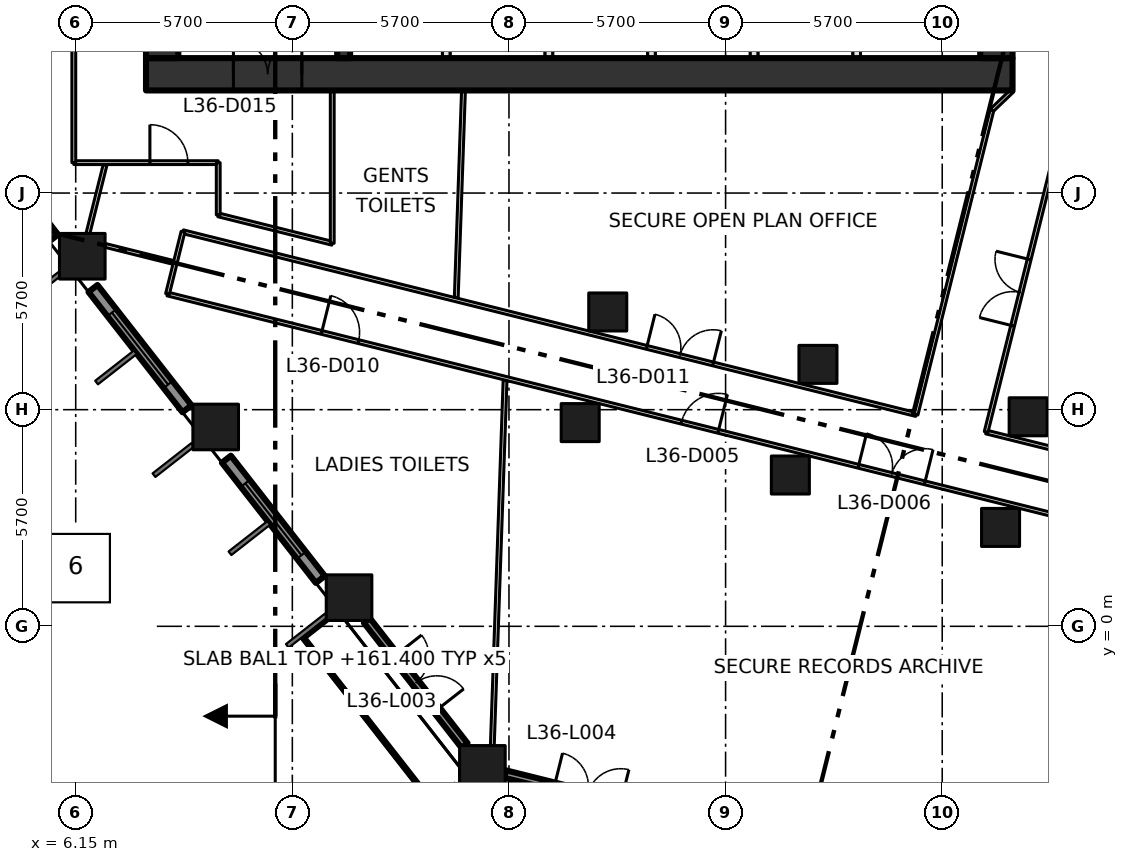
"""IFC4 building model, lengths in metres.
Left out: names, types, materials, properties, quantities, classifications, styles, units other than length and angle.
Written with IfcOpenShell. Run it as: python <this file> out.ifc"""

import sys

from ifc_helpers import new_model, si_unit, direction, frame, frame_2d, origin, origin_2d, place, context, subcontext, project, spatial, rectangle, extrude, element, fill, save


model = new_model("IFC4")
c1 = context("Model", 3, precision=1e-05, world=origin(), true_north=direction((0.0, 1.0)))
c2 = subcontext(c1, "Body", "Model", "MODEL_VIEW")
j1 = project(units=[si_unit("LENGTHUNIT", "METRE"), si_unit("PLANEANGLEUNIT", "RADIAN")], contexts=[c1])
p1 = place(None, origin())
s1 = spatial("IfcSite", under=j1, at=p1, CompositionType="ELEMENT")
p2 = place(p1, origin())
s2 = spatial("IfcBuilding", under=s1, at=p2, CompositionType="ELEMENT")
p3 = place(p2, frame((0.0, 0.0, 161.4)))
s3 = spatial("IfcBuildingStorey", under=s2, at=p3, CompositionType="ELEMENT", Elevation=161.4)
for number, where, z_axis, x_axis in (
    (1, (16.851, -3.738, 0.0), (0.0, 0.0, 1.0), (1.0, 0.0, 0.0)),
    (2, (13.342, 0.754, 0.0), (0.0, 0.0, 1.0), (1.0, 0.0, 0.0)),
    (3, (9.833, 5.245, 0.0), (0.0, 0.0, 1.0), (1.0, 0.0, 0.0)),
    (4, (6.323, 9.737, 0.0), (0.0, 0.0, 1.0), (1.0, 0.0, 0.0)),
):
    element("IfcColumn", number, at=place(p3, frame(where, z_axis=z_axis, x_axis=x_axis)), inside=s3, PredefinedType="COLUMN", context=c2, shape_type="SweptSolid", body=[
        extrude(rectangle(XDim=1.2, YDim=1.2, at=origin_2d()), origin(), (0.0, 0.0, 1.0), 4.2),
    ])
for number, where, z_axis, x_axis in (
    (5, (19.424, 5.36, 0.0), (0.0, 0.0, 1.0), (1.0, 0.0, 0.0)),
    (6, (24.954, 3.981, 0.0), (0.0, 0.0, 1.0), (1.0, 0.0, 0.0)),
    (7, (30.485, 2.602, 0.0), (0.0, 0.0, 1.0), (1.0, 0.0, 0.0)),
    (8, (20.149, 8.271, 0.0), (0.0, 0.0, 1.0), (1.0, 0.0, 0.0)),
    (9, (25.68, 6.892, 0.0), (0.0, 0.0, 1.0), (1.0, 0.0, 0.0)),
    (10, (31.211, 5.513, 0.0), (0.0, 0.0, 1.0), (1.0, 0.0, 0.0)),
):
    element("IfcColumn", number, at=place(p3, frame(where, z_axis=z_axis, x_axis=x_axis)), inside=s3, PredefinedType="COLUMN", context=c2, shape_type="SweptSolid", body=[
        extrude(rectangle(XDim=1.0, YDim=1.0, at=origin_2d()), origin(), (0.0, 0.0, 1.0), 4.2),
    ])
p4 = place(p3, frame((8.0, 14.525, -0.3), z_axis=(0.0, 0.0, 1.0), x_axis=(1.0, 0.0, 0.0)))
e11 = element("IfcWall", 11, at=p4, inside=s3, PredefinedType="SHEAR", context=c2, shape_type="SweptSolid", body=[
    extrude(rectangle(XDim=22.8, YDim=0.85, at=frame_2d((11.4, 0.0))), origin(), (0.0, 0.0, 1.0), 4.2),
])
p5 = place(p4, frame((2.3, 0.0, 0.3)))
e12 = element("IfcOpeningElement", 12, at=p5, cuts=e11, PredefinedType="OPENING", context=c2, shape_type="SweptSolid", body=[
    extrude(rectangle(XDim=1.8, YDim=2.1, at=frame_2d((0.9, 1.05))), frame((0.0, 0.435, 0.0), z_axis=(0.0, -1.0, 0.0), x_axis=(1.0, 0.0, 0.0)), (0.0, 0.0, 1.0), 0.87),
])
for number, where, z_axis, x_axis in (
    (13, (8.425, 14.95, -0.3), (0.0, 0.0, 1.0), (0.0, 1.0, 0.0)),
    (14, (30.375, 14.95, -0.3), (0.0, 0.0, 1.0), (0.0, 1.0, 0.0)),
):
    element("IfcWall", number, at=place(p3, frame(where, z_axis=z_axis, x_axis=x_axis)), inside=s3, PredefinedType="SHEAR", context=c2, shape_type="SweptSolid", body=[
        extrude(rectangle(XDim=20.75, YDim=0.85, at=frame_2d((10.375, 0.0))), origin(), (0.0, 0.0, 1.0), 4.2),
    ])
p6 = place(p3, frame((13.2, 14.95, 0.0), z_axis=(0.0, 0.0, 1.0), x_axis=(0.0, 1.0, 0.0)))
e15 = element("IfcWall", 15, at=p6, inside=s3, PredefinedType="SHEAR", context=c2, shape_type="SweptSolid", body=[
    extrude(rectangle(XDim=20.75, YDim=0.34, at=frame_2d((10.375, 0.0))), origin(), (0.0, 0.0, 1.0), 3.9),
])
p7 = place(p6, frame((3.35, 0.0, 0.0)))
e16 = element("IfcOpeningElement", 16, at=p7, cuts=e15, PredefinedType="OPENING", context=c2, shape_type="SweptSolid", body=[
    extrude(rectangle(XDim=1.8, YDim=2.1, at=frame_2d((0.9, 1.05))), frame((0.0, 0.18, 0.0), z_axis=(0.0, -1.0, 0.0), x_axis=(1.0, 0.0, 0.0)), (0.0, 0.0, 1.0), 0.36),
])
p8 = place(p6, frame((11.45, 0.0, 0.0)))
e17 = element("IfcOpeningElement", 17, at=p8, cuts=e15, PredefinedType="OPENING", context=c2, shape_type="SweptSolid", body=[
    extrude(rectangle(XDim=1.2, YDim=2.1, at=frame_2d((0.6, 1.05))), frame((0.0, 0.18, 0.0), z_axis=(0.0, -1.0, 0.0), x_axis=(1.0, 0.0, 0.0)), (0.0, 0.0, 1.0), 0.36),
])
for number, where, z_axis, x_axis in (
    (18, (15.9, 14.95, 0.0), (0.0, 0.0, 1.0), (0.0, 1.0, 0.0)),
    (19, (18.6, 14.95, 0.0), (0.0, 0.0, 1.0), (0.0, 1.0, 0.0)),
    (20, (21.3, 14.95, 0.0), (0.0, 0.0, 1.0), (0.0, 1.0, 0.0)),
    (21, (24.0, 14.95, 0.0), (0.0, 0.0, 1.0), (0.0, 1.0, 0.0)),
    (22, (26.7, 14.95, 0.0), (0.0, 0.0, 1.0), (0.0, 1.0, 0.0)),
):
    element("IfcWall", number, at=place(p3, frame(where, z_axis=z_axis, x_axis=x_axis)), inside=s3, PredefinedType="SOLIDWALL", context=c2, shape_type="SweptSolid", body=[
        extrude(rectangle(XDim=2.65, YDim=0.2, at=frame_2d((1.325, 0.0))), origin(), (0.0, 0.0, 1.0), 3.9),
    ])
p9 = place(p3, frame((3.096, 13.381, 0.0), z_axis=(0.0, 0.0, 1.0), x_axis=(0.615563820493, -0.78808704018, 0.0)))
e23 = element("IfcWall", 23, at=p9, inside=s3, PredefinedType="SOLIDWALL", context=c2, shape_type="SweptSolid", body=[
    extrude(rectangle(XDim=4.016, YDim=0.3, at=frame_2d((2.008, 0.0))), origin(), (0.0, 0.0, 1.0), 3.15),
])
p10 = place(p9, frame((0.808, 0.0, 0.8)))
e24 = element("IfcOpeningElement", 24, at=p10, cuts=e23, PredefinedType="OPENING", context=c2, shape_type="SweptSolid", body=[
    extrude(rectangle(XDim=2.4, YDim=2.1, at=frame_2d((1.2, 1.05))), frame((0.0, 0.16, 0.0), z_axis=(0.0, -1.0, 0.0), x_axis=(1.0, 0.0, 0.0)), (0.0, 0.0, 1.0), 0.32),
])
p11 = place(p3, frame((6.605, 8.889, 0.0), z_axis=(0.0, 0.0, 1.0), x_axis=(0.615706559089, -0.787975528233, 0.0)))
e25 = element("IfcWall", 25, at=p11, inside=s3, PredefinedType="SOLIDWALL", context=c2, shape_type="SweptSolid", body=[
    extrude(rectangle(XDim=4.016, YDim=0.3, at=frame_2d((2.008, 0.0))), origin(), (0.0, 0.0, 1.0), 3.15),
])
p12 = place(p11, frame((0.808, 0.0, 0.8)))
e26 = element("IfcOpeningElement", 26, at=p12, cuts=e25, PredefinedType="OPENING", context=c2, shape_type="SweptSolid", body=[
    extrude(rectangle(XDim=2.4, YDim=2.1, at=frame_2d((1.2, 1.05))), frame((0.0, 0.16, 0.0), z_axis=(0.0, -1.0, 0.0), x_axis=(1.0, 0.0, 0.0)), (0.0, 0.0, 1.0), 0.32),
])
p13 = place(p3, frame((10.115, 4.397, 0.0), z_axis=(0.0, 0.0, 1.0), x_axis=(0.615644041972, -0.788024373725, 0.0)))
e27 = element("IfcWall", 27, at=p13, inside=s3, PredefinedType="SOLIDWALL", context=c2, shape_type="SweptSolid", body=[
    extrude(rectangle(XDim=4.015, YDim=0.3, at=frame_2d((2.008, 0.0))), origin(), (0.0, 0.0, 1.0), 3.15),
])
p14 = place(p13, frame((0.807, 0.0, 0.8)))
e28 = element("IfcOpeningElement", 28, at=p14, cuts=e27, PredefinedType="OPENING", context=c2, shape_type="SweptSolid", body=[
    extrude(rectangle(XDim=2.4, YDim=2.1, at=frame_2d((1.2, 1.05))), frame((0.0, 0.16, 0.0), z_axis=(0.0, -1.0, 0.0), x_axis=(1.0, 0.0, 0.0)), (0.0, 0.0, 1.0), 0.32),
])
p15 = place(p3, frame((13.811, 0.154, 0.0), z_axis=(0.0, 0.0, 1.0), x_axis=(0.615521537177, -0.788120065264, 0.0)))
e29 = element("IfcWall", 29, at=p15, inside=s3, PredefinedType="SOLIDWALL", context=c2, shape_type="SweptSolid", body=[
    extrude(rectangle(XDim=4.177, YDim=0.2, at=frame_2d((2.088, 0.0))), origin(), (0.0, 0.0, 1.0), 3.15),
])
p16 = place(p15, frame((1.188, 0.0, 0.0)))
e30 = element("IfcOpeningElement", 30, at=p16, cuts=e29, PredefinedType="OPENING", context=c2, shape_type="SweptSolid", body=[
    extrude(rectangle(XDim=1.8, YDim=2.9, at=frame_2d((0.9, 1.45))), frame((0.0, 0.11, 0.0), z_axis=(0.0, -1.0, 0.0), x_axis=(1.0, 0.0, 0.0)), (0.0, 0.0, 1.0), 0.22),
])
p17 = place(p3, frame((12.398, -0.199, 0.0), z_axis=(0.0, 0.0, 1.0), x_axis=(0.615638738903, -0.788028516719, 0.0)))
e31 = element("IfcWall", 31, at=p17, inside=s3, PredefinedType="SOLIDWALL", context=c2, shape_type="SweptSolid", body=[
    extrude(rectangle(XDim=5.36, YDim=0.4, at=frame_2d((2.68, 0.0))), origin(), (0.0, 0.0, 1.0), 0.3),
])
p18 = place(p3, frame((17.451, -3.888, 0.0), z_axis=(0.0, 0.0, 1.0), x_axis=(0.970335243139, -0.241763346938, 0.0)))
e32 = element("IfcWall", 32, at=p18, inside=s3, PredefinedType="SOLIDWALL", context=c2, shape_type="SweptSolid", body=[
    extrude(rectangle(XDim=4.463, YDim=0.2, at=frame_2d((2.232, 0.0))), origin(), (0.0, 0.0, 1.0), 3.15),
])
p19 = place(p18, frame((1.331, 0.0, 0.0)))
e33 = element("IfcOpeningElement", 33, at=p19, cuts=e32, PredefinedType="OPENING", context=c2, shape_type="SweptSolid", body=[
    extrude(rectangle(XDim=1.8, YDim=2.9, at=frame_2d((0.9, 1.45))), frame((0.0, 0.11, 0.0), z_axis=(0.0, -1.0, 0.0), x_axis=(1.0, 0.0, 0.0)), (0.0, 0.0, 1.0), 0.22),
])
p20 = place(p3, frame((6.1, 12.2, 0.0), z_axis=(0.0, 0.0, 1.0), x_axis=(1.0, 0.0, 0.0)))
e34 = element("IfcWall", 34, at=p20, inside=s3, PredefinedType="PARTITIONING", context=c2, shape_type="SweptSolid", body=[
    extrude(rectangle(XDim=3.8, YDim=0.1, at=frame_2d((1.9, 0.0))), origin(), (0.0, 0.0, 1.0), 3.9),
])
p21 = place(p20, frame((2.002, 0.0, 0.0)))
e35 = element("IfcOpeningElement", 35, at=p21, cuts=e34, PredefinedType="OPENING", context=c2, shape_type="SweptSolid", body=[
    extrude(rectangle(XDim=1.0, YDim=2.1, at=frame_2d((0.5, 1.05))), frame((0.0, 0.06, 0.0), z_axis=(0.0, -1.0, 0.0), x_axis=(1.0, 0.0, 0.0)), (0.0, 0.0, 1.0), 0.12),
])
p22 = place(p3, frame((6.1, 38.9, 0.0), z_axis=(0.0, 0.0, 1.0), x_axis=(0.0, -1.0, 0.0)))
e36 = element("IfcWall", 36, at=p22, inside=s3, PredefinedType="PARTITIONING", context=c2, shape_type="SweptSolid", body=[
    extrude(rectangle(XDim=26.7, YDim=0.1, at=frame_2d((13.35, 0.0))), origin(), (0.0, 0.0, 1.0), 3.9),
])
p23 = place(p22, frame((20.61, 0.0, 0.0)))
e37 = element("IfcOpeningElement", 37, at=p23, cuts=e36, PredefinedType="OPENING", context=c2, shape_type="SweptSolid", body=[
    extrude(rectangle(XDim=1.0, YDim=2.1, at=frame_2d((0.5, 1.05))), frame((0.0, 0.06, 0.0), z_axis=(0.0, -1.0, 0.0), x_axis=(1.0, 0.0, 0.0)), (0.0, 0.0, 1.0), 0.12),
])
p24 = place(p22, frame((7.18, 0.0, 0.0)))
e38 = element("IfcOpeningElement", 38, at=p24, cuts=e36, PredefinedType="OPENING", context=c2, shape_type="SweptSolid", body=[
    extrude(rectangle(XDim=1.8, YDim=2.1, at=frame_2d((0.9, 1.05))), frame((0.0, 0.06, 0.0), z_axis=(0.0, -1.0, 0.0), x_axis=(1.0, 0.0, 0.0)), (0.0, 0.0, 1.0), 0.12),
])
p25 = place(p3, frame((8.565, 8.744, 0.0), z_axis=(0.0, 0.0, 1.0), x_axis=(0.970296742948, -0.241917817915, 0.0)))
e39 = element("IfcWall", 39, at=p25, inside=s3, PredefinedType="PARTITIONING", context=c2, shape_type="SweptSolid", body=[
    extrude(rectangle(XDim=57.374, YDim=0.1, at=frame_2d((28.687, 0.0))), origin(), (0.0, 0.0, 1.0), 3.9),
])
p26 = place(p25, frame((46.936, 0.0, 0.0)))
e40 = element("IfcOpeningElement", 40, at=p26, cuts=e39, PredefinedType="OPENING", context=c2, shape_type="SweptSolid", body=[
    extrude(rectangle(XDim=1.0, YDim=2.1, at=frame_2d((0.5, 1.05))), frame((0.0, 0.06, 0.0), z_axis=(0.0, -1.0, 0.0), x_axis=(1.0, 0.0, 0.0)), (0.0, 0.0, 1.0), 0.12),
])
p27 = place(p25, frame((13.936, 0.0, 0.0)))
e41 = element("IfcOpeningElement", 41, at=p27, cuts=e39, PredefinedType="OPENING", context=c2, shape_type="SweptSolid", body=[
    extrude(rectangle(XDim=1.0, YDim=2.1, at=frame_2d((0.5, 1.05))), frame((0.0, 0.06, 0.0), z_axis=(0.0, -1.0, 0.0), x_axis=(1.0, 0.0, 0.0)), (0.0, 0.0, 1.0), 0.12),
])
p28 = place(p25, frame((18.736, 0.0, 0.0)))
e42 = element("IfcOpeningElement", 42, at=p28, cuts=e39, PredefinedType="OPENING", context=c2, shape_type="SweptSolid", body=[
    extrude(rectangle(XDim=1.8, YDim=2.1, at=frame_2d((0.9, 1.05))), frame((0.0, 0.06, 0.0), z_axis=(0.0, -1.0, 0.0), x_axis=(1.0, 0.0, 0.0)), (0.0, 0.0, 1.0), 0.12),
])
p29 = place(p25, frame((31.036, 0.0, 0.0)))
e43 = element("IfcOpeningElement", 43, at=p29, cuts=e39, PredefinedType="OPENING", context=c2, shape_type="SweptSolid", body=[
    extrude(rectangle(XDim=1.8, YDim=2.1, at=frame_2d((0.9, 1.05))), frame((0.0, 0.06, 0.0), z_axis=(0.0, -1.0, 0.0), x_axis=(1.0, 0.0, 0.0)), (0.0, 0.0, 1.0), 0.12),
])
p30 = place(p25, frame((4.18, 0.0, 0.0)))
e44 = element("IfcOpeningElement", 44, at=p30, cuts=e39, PredefinedType="OPENING", context=c2, shape_type="SweptSolid", body=[
    extrude(rectangle(XDim=1.0, YDim=2.1, at=frame_2d((0.5, 1.05))), frame((0.0, 0.06, 0.0), z_axis=(0.0, -1.0, 0.0), x_axis=(1.0, 0.0, 0.0)), (0.0, 0.0, 1.0), 0.12),
])
p31 = place(p3, frame((8.973, 10.382, 0.0), z_axis=(0.0, 0.0, 1.0), x_axis=(0.970286808807, -0.241957658808, 0.0)))
e45 = element("IfcWall", 45, at=p31, inside=s3, PredefinedType="PARTITIONING", context=c2, shape_type="SweptSolid", body=[
    extrude(rectangle(XDim=19.88, YDim=0.1, at=frame_2d((9.94, 0.0))), origin(), (0.0, 0.0, 1.0), 3.9),
])
p32 = place(p31, frame((12.575, 0.0, 0.0)))
e46 = element("IfcOpeningElement", 46, at=p32, cuts=e45, PredefinedType="OPENING", context=c2, shape_type="SweptSolid", body=[
    extrude(rectangle(XDim=1.8, YDim=2.1, at=frame_2d((0.9, 1.05))), frame((0.0, 0.06, 0.0), z_axis=(0.0, -1.0, 0.0), x_axis=(1.0, 0.0, 0.0)), (0.0, 0.0, 1.0), 0.12),
])
p33 = place(p3, frame((8.973, 10.382, 0.0), z_axis=(0.0, 0.0, 1.0), x_axis=(-0.241650823739, -0.970363271866, 0.0)))
e47 = element("IfcWall", 47, at=p33, inside=s3, PredefinedType="PARTITIONING", context=c2, shape_type="SweptSolid", body=[
    extrude(rectangle(XDim=1.688, YDim=0.1, at=frame_2d((0.844, 0.0))), origin(), (0.0, 0.0, 1.0), 3.9),
])
p34 = place(p3, frame((9.9, 10.826, 0.0), z_axis=(0.0, 0.0, 1.0), x_axis=(0.970290953223, -0.241941038466, 0.0)))
e48 = element("IfcWall", 48, at=p34, inside=s3, PredefinedType="PARTITIONING", context=c2, shape_type="SweptSolid", body=[
    extrude(rectangle(XDim=3.092, YDim=0.1, at=frame_2d((1.546, 0.0))), origin(), (0.0, 0.0, 1.0), 3.9),
])
p35 = place(p3, frame((9.9, 12.2, 0.0), z_axis=(0.0, 0.0, 1.0), x_axis=(0.0, -1.0, 0.0)))
e49 = element("IfcWall", 49, at=p35, inside=s3, PredefinedType="PARTITIONING", context=c2, shape_type="SweptSolid", body=[
    extrude(rectangle(XDim=1.374, YDim=0.1, at=frame_2d((0.687, 0.0))), origin(), (0.0, 0.0, 1.0), 3.9),
])
p36 = place(p3, frame((12.9, 10.078, 0.0), z_axis=(0.0, 0.0, 1.0), x_axis=(0.0, 1.0, 0.0)))
e50 = element("IfcWall", 50, at=p36, inside=s3, PredefinedType="PARTITIONING", context=c2, shape_type="SweptSolid", body=[
    extrude(rectangle(XDim=4.022, YDim=0.1, at=frame_2d((2.011, 0.0))), origin(), (0.0, 0.0, 1.0), 3.9),
])
p37 = place(p3, frame((30.105, 5.113, 0.0), z_axis=(0.0, 0.0, 1.0), x_axis=(0.970292395556, -0.241935253995, 0.0)))
e51 = element("IfcWall", 51, at=p37, inside=s3, PredefinedType="PARTITIONING", context=c2, shape_type="SweptSolid", body=[
    extrude(rectangle(XDim=35.596, YDim=0.1, at=frame_2d((17.798, 0.0))), origin(), (0.0, 0.0, 1.0), 3.9),
])
p38 = place(p37, frame((21.796, 0.0, 0.0)))
e52 = element("IfcOpeningElement", 52, at=p38, cuts=e51, PredefinedType="OPENING", context=c2, shape_type="SweptSolid", body=[
    extrude(rectangle(XDim=1.0, YDim=2.1, at=frame_2d((0.5, 1.05))), frame((0.0, 0.06, 0.0), z_axis=(0.0, -1.0, 0.0), x_axis=(1.0, 0.0, 0.0)), (0.0, 0.0, 1.0), 0.12),
])
p39 = place(p3, frame((30.105, 5.113, 0.0), z_axis=(0.0, 0.0, 1.0), x_axis=(0.241984285369, 0.970280168629, 0.0)))
e53 = element("IfcWall", 53, at=p39, inside=s3, PredefinedType="PARTITIONING", context=c2, shape_type="SweptSolid", body=[
    extrude(rectangle(XDim=8.232, YDim=0.1, at=frame_2d((4.116, 0.0))), origin(), (0.0, 0.0, 1.0), 3.9),
])
p40 = place(p39, frame((2.88, 0.0, 0.0)))
e54 = element("IfcOpeningElement", 54, at=p40, cuts=e53, PredefinedType="OPENING", context=c2, shape_type="SweptSolid", body=[
    extrude(rectangle(XDim=1.8, YDim=2.1, at=frame_2d((0.9, 1.05))), frame((0.0, 0.06, 0.0), z_axis=(0.0, -1.0, 0.0), x_axis=(1.0, 0.0, 0.0)), (0.0, 0.0, 1.0), 0.12),
])
p41 = place(p3, frame((30.259, 13.583, 0.0), z_axis=(0.0, 0.0, 1.0), x_axis=(-0.241888494143, -0.970304053584, 0.0)))
e55 = element("IfcWall", 55, at=p41, inside=s3, PredefinedType="PARTITIONING", context=c2, shape_type="SweptSolid", body=[
    extrude(rectangle(XDim=8.256, YDim=0.1, at=frame_2d((4.128, 0.0))), origin(), (0.0, 0.0, 1.0), 3.9),
])
p42 = place(p3, frame((30.8, 14.1, 0.0), z_axis=(0.0, 0.0, 1.0), x_axis=(-0.722911025189, -0.690941133281, 0.0)))
e56 = element("IfcWall", 56, at=p42, inside=s3, PredefinedType="PARTITIONING", context=c2, shape_type="SweptSolid", body=[
    extrude(rectangle(XDim=0.748, YDim=0.1, at=frame_2d((0.374, 0.0))), origin(), (0.0, 0.0, 1.0), 3.9),
])
p43 = place(p3, frame((6.922, 12.138, 0.0), z_axis=(0.0, 0.0, 1.0), x_axis=(-0.242504681353, -0.970150235542, 0.0)))
e57 = element("IfcWall", 57, at=p43, inside=s3, PredefinedType="PARTITIONING", context=c2, shape_type="SweptSolid", body=[
    extrude(rectangle(XDim=1.856, YDim=0.1, at=frame_2d((0.928, 0.0))), origin(), (0.0, 0.0, 1.0), 3.9),
])
p44 = place(p3, frame((8.72, 9.574, 0.0), z_axis=(0.0, 0.0, 1.0), x_axis=(-0.97017350799, 0.242411559945, 0.0)))
e58 = element("IfcWall", 58, at=p44, inside=s3, PredefinedType="PARTITIONING", context=c2, shape_type="SweptSolid", body=[
    extrude(rectangle(XDim=1.852, YDim=0.1, at=frame_2d((0.926, 0.0))), origin(), (0.0, 0.0, 1.0), 3.9),
])
p45 = place(p3, frame((16.163, 8.652, 0.0), z_axis=(0.0, 0.0, 1.0), x_axis=(0.034843270883, 0.999392788884, 0.0)))
e59 = element("IfcWall", 59, at=p45, inside=s3, PredefinedType="PARTITIONING", context=c2, shape_type="SweptSolid", body=[
    extrude(rectangle(XDim=5.451, YDim=0.1, at=frame_2d((2.726, 0.0))), origin(), (0.0, 0.0, 1.0), 3.9),
])
p46 = place(p3, frame((17.112, -3.138, 0.0), z_axis=(0.0, 0.0, 1.0), x_axis=(0.034852485017, 0.999392467596, 0.0)))
e60 = element("IfcWall", 60, at=p46, inside=s3, PredefinedType="PARTITIONING", context=c2, shape_type="SweptSolid", body=[
    extrude(rectangle(XDim=9.611, YDim=0.1, at=frame_2d((4.805, 0.0))), origin(), (0.0, 0.0, 1.0), 3.9),
])
p47 = place(p5, origin())
e61 = element("IfcDoor", 61, at=p47, inside=s3, OperationType="DOUBLE_DOOR_SINGLE_SWING", PredefinedType="DOOR", context=c2, shape_type="SweptSolid", body=[
    extrude(rectangle(XDim=1.8, YDim=2.1, at=frame_2d((0.9, 1.05))), frame((0.0, 0.025, 0.0), z_axis=(0.0, -1.0, 0.0), x_axis=(1.0, 0.0, 0.0)), (0.0, 0.0, 1.0), 0.05),
])
fill(e12, e61)
p48 = place(p12, origin())
e62 = element("IfcWindow", 62, at=p48, inside=s3, PartitioningType="DOUBLE_PANEL_VERTICAL", PredefinedType="WINDOW", context=c2, shape_type="SweptSolid", body=[
    extrude(rectangle(XDim=2.4, YDim=2.1, at=frame_2d((1.2, 1.05))), frame((0.0, 0.03, 0.0), z_axis=(0.0, -1.0, 0.0), x_axis=(1.0, 0.0, 0.0)), (0.0, 0.0, 1.0), 0.06),
])
fill(e26, e62)
p49 = place(p14, origin())
e63 = element("IfcWindow", 63, at=p49, inside=s3, PartitioningType="DOUBLE_PANEL_VERTICAL", PredefinedType="WINDOW", context=c2, shape_type="SweptSolid", body=[
    extrude(rectangle(XDim=2.4, YDim=2.1, at=frame_2d((1.2, 1.05))), frame((0.0, 0.03, 0.0), z_axis=(0.0, -1.0, 0.0), x_axis=(1.0, 0.0, 0.0)), (0.0, 0.0, 1.0), 0.06),
])
fill(e28, e63)
p50 = place(p16, origin())
e64 = element("IfcDoor", 64, at=p50, inside=s3, OperationType="DOUBLE_DOOR_SINGLE_SWING", PredefinedType="DOOR", context=c2, shape_type="SweptSolid", body=[
    extrude(rectangle(XDim=1.8, YDim=2.9, at=frame_2d((0.9, 1.45))), frame((0.0, 0.025, 0.0), z_axis=(0.0, -1.0, 0.0), x_axis=(1.0, 0.0, 0.0)), (0.0, 0.0, 1.0), 0.05),
])
fill(e30, e64)
p51 = place(p27, origin())
e65 = element("IfcDoor", 65, at=p51, inside=s3, OperationType="SINGLE_SWING_RIGHT", PredefinedType="DOOR", context=c2, shape_type="SweptSolid", body=[
    extrude(rectangle(XDim=1.0, YDim=2.1, at=frame_2d((0.5, 1.05))), frame((0.0, 0.025, 0.0), z_axis=(0.0, -1.0, 0.0), x_axis=(1.0, 0.0, 0.0)), (0.0, 0.0, 1.0), 0.05),
])
fill(e41, e65)
p52 = place(p28, origin())
e66 = element("IfcDoor", 66, at=p52, inside=s3, OperationType="DOUBLE_DOOR_SINGLE_SWING", PredefinedType="DOOR", context=c2, shape_type="SweptSolid", body=[
    extrude(rectangle(XDim=1.8, YDim=2.1, at=frame_2d((0.9, 1.05))), frame((0.0, 0.025, 0.0), z_axis=(0.0, -1.0, 0.0), x_axis=(1.0, 0.0, 0.0)), (0.0, 0.0, 1.0), 0.05),
])
fill(e42, e66)
p53 = place(p30, origin())
e67 = element("IfcDoor", 67, at=p53, inside=s3, OperationType="SINGLE_SWING_LEFT", PredefinedType="DOOR", context=c2, shape_type="SweptSolid", body=[
    extrude(rectangle(XDim=1.0, YDim=2.1, at=frame_2d((0.5, 1.05))), frame((0.0, 0.025, 0.0), z_axis=(0.0, -1.0, 0.0), x_axis=(1.0, 0.0, 0.0)), (0.0, 0.0, 1.0), 0.05),
])
fill(e44, e67)
p54 = place(p32, origin())
e68 = element("IfcDoor", 68, at=p54, inside=s3, OperationType="DOUBLE_DOOR_SINGLE_SWING", PredefinedType="DOOR", context=c2, shape_type="SweptSolid", body=[
    extrude(rectangle(XDim=1.8, YDim=2.1, at=frame_2d((0.9, 1.05))), frame((0.0, 0.025, 0.0), z_axis=(0.0, -1.0, 0.0), x_axis=(1.0, 0.0, 0.0)), (0.0, 0.0, 1.0), 0.05),
])
fill(e46, e68)
p55 = place(p40, origin())
e69 = element("IfcDoor", 69, at=p55, inside=s3, OperationType="DOUBLE_DOOR_SINGLE_SWING", PredefinedType="DOOR", context=c2, shape_type="SweptSolid", body=[
    extrude(rectangle(XDim=1.8, YDim=2.1, at=frame_2d((0.9, 1.05))), frame((0.0, 0.025, 0.0), z_axis=(0.0, -1.0, 0.0), x_axis=(1.0, 0.0, 0.0)), (0.0, 0.0, 1.0), 0.05),
])
fill(e54, e69)
p56 = place(p21, origin())
e70 = element("IfcDoor", 70, at=p56, inside=s3, OperationType="SINGLE_SWING_LEFT", PredefinedType="DOOR", context=c2, shape_type="SweptSolid", body=[
    extrude(rectangle(XDim=1.0, YDim=2.1, at=frame_2d((0.5, 1.05))), frame((0.0, 0.025, 0.0), z_axis=(0.0, -1.0, 0.0), x_axis=(1.0, 0.0, 0.0)), (0.0, 0.0, 1.0), 0.05),
])
fill(e35, e70)
save(model, sys.argv[1])
